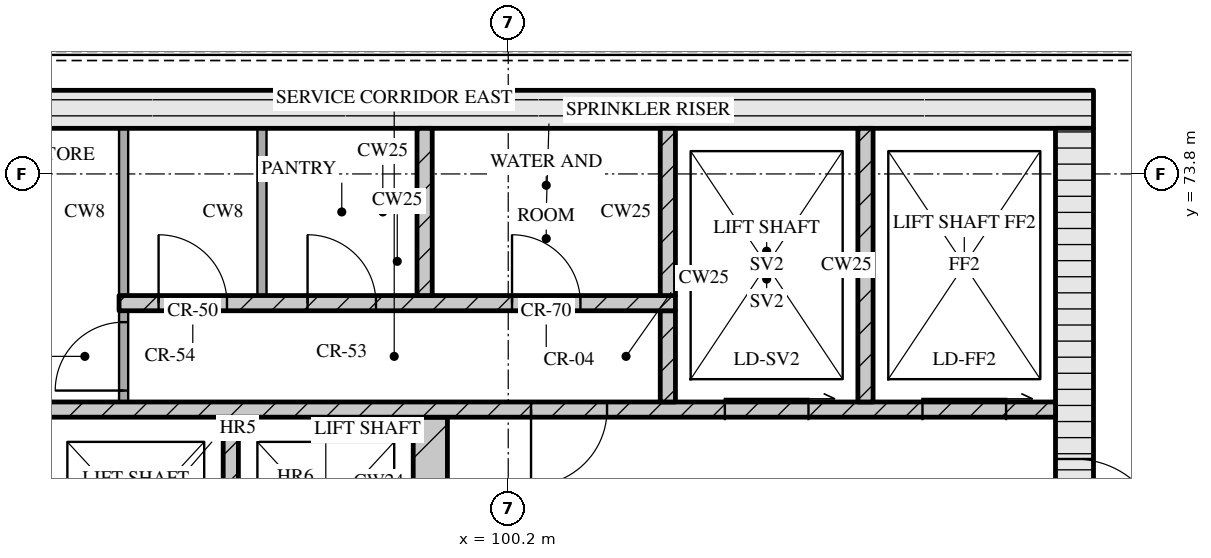
"""IFC4 building model, lengths in metres.
Left out: names, types, materials, properties, quantities, classifications, styles, units other than length and angle.
Written with IfcOpenShell. Run it as: python <this file> out.ifc"""

import sys

from ifc_helpers import new_model, si_unit, direction, frame, frame_2d, origin, place, context, subcontext, project, spatial, rectangle, extrude, element, fill, save


model = new_model("IFC4")
c1 = context("Model", 3, precision=1e-05, world=origin(), true_north=direction((0.0, 1.0)))
c2 = subcontext(c1, "Body", "Model", "MODEL_VIEW")
j1 = project(units=[si_unit("LENGTHUNIT", "METRE"), si_unit("PLANEANGLEUNIT", "RADIAN")], contexts=[c1])
p1 = place(None, origin())
s1 = spatial("IfcSite", under=j1, at=p1, CompositionType="ELEMENT")
p2 = place(p1, origin())
s2 = spatial("IfcBuilding", under=s1, at=p2, CompositionType="ELEMENT")
p3 = place(p2, frame((0.0, 0.0, 274.35)))
s3 = spatial("IfcBuildingStorey", under=s2, at=p3, CompositionType="ELEMENT", Elevation=274.35)
p4 = place(p3, frame((67.3, 74.65, 0.0), z_axis=(0.0, 0.0, 1.0), x_axis=(1.0, 0.0, 0.0)))
e1 = element("IfcWall", 1, at=p4, inside=s3, PredefinedType="SOLIDWALL", context=c2, shape_type="SweptSolid", body=[
    extrude(rectangle(XDim=40.6, YDim=0.5, at=frame_2d((20.3, 0.0))), origin(), (0.0, 0.0, 1.0), 3.32),
])
p5 = place(p3, frame((107.65, 62.4, 0.0), z_axis=(0.0, 0.0, 1.0), x_axis=(0.0, 1.0, 0.0)))
e2 = element("IfcWall", 2, at=p5, inside=s3, PredefinedType="SOLIDWALL", context=c2, shape_type="SweptSolid", body=[
    extrude(rectangle(XDim=12.0, YDim=0.5, at=frame_2d((6.0, 0.0))), origin(), (0.0, 0.0, 1.0), 3.32),
])
p6 = place(p5, frame((6.45, 0.0, 0.0)))
e3 = element("IfcOpeningElement", 3, at=p6, cuts=e2, PredefinedType="OPENING", context=c2, shape_type="SweptSolid", body=[
    extrude(rectangle(XDim=1.2, YDim=2.1, at=frame_2d((0.6, 1.05))), frame((0.0, 0.26, 0.0), z_axis=(0.0, -1.0, 0.0), x_axis=(1.0, 0.0, 0.0)), (0.0, 0.0, 1.0), 0.52),
])
p7 = place(p3, frame((96.55, 68.0, 0.0), z_axis=(0.0, 0.0, 1.0), x_axis=(0.0, 1.0, 0.0)))
e4 = element("IfcWall", 4, at=p7, inside=s3, PredefinedType="SOLIDWALL", context=c2, shape_type="SweptSolid", body=[
    extrude(rectangle(XDim=2.6, YDim=0.2, at=frame_2d((1.3, 0.0))), origin(), (0.0, 0.0, 1.0), 3.32),
])
p8 = place(p3, frame((99.175, 68.3, 0.0), z_axis=(0.0, 0.0, 1.0), x_axis=(0.0, 1.0, 0.0)))
e5 = element("IfcWall", 5, at=p8, inside=s3, PredefinedType="SOLIDWALL", context=c2, shape_type="SweptSolid", body=[
    extrude(rectangle(XDim=2.3, YDim=0.45, at=frame_2d((1.15, 0.0))), origin(), (0.0, 0.0, 1.0), 3.32),
])
p9 = place(p3, frame((67.8, 70.7, 0.0), z_axis=(0.0, 0.0, 1.0), x_axis=(1.0, 0.0, 0.0)))
e6 = element("IfcWall", 6, at=p9, inside=s3, PredefinedType="SOLIDWALL", context=c2, shape_type="SweptSolid", body=[
    extrude(rectangle(XDim=39.6, YDim=0.2, at=frame_2d((19.8, 0.0))), origin(), (0.0, 0.0, 1.0), 3.32),
])
p10 = place(p9, frame((0.65, 0.0, 0.0)))
e7 = element("IfcOpeningElement", 7, at=p10, cuts=e6, PredefinedType="OPENING", context=c2, shape_type="SweptSolid", body=[
    extrude(rectangle(XDim=1.1, YDim=2.1, at=frame_2d((0.55, 1.05))), frame((0.0, 0.11, 0.0), z_axis=(0.0, -1.0, 0.0), x_axis=(1.0, 0.0, 0.0)), (0.0, 0.0, 1.0), 0.22),
])
p11 = place(p9, frame((3.25, 0.0, 0.0)))
e8 = element("IfcOpeningElement", 8, at=p11, cuts=e6, PredefinedType="OPENING", context=c2, shape_type="SweptSolid", body=[
    extrude(rectangle(XDim=1.1, YDim=2.1, at=frame_2d((0.55, 1.05))), frame((0.0, 0.11, 0.0), z_axis=(0.0, -1.0, 0.0), x_axis=(1.0, 0.0, 0.0)), (0.0, 0.0, 1.0), 0.22),
])
p12 = place(p9, frame((5.9, 0.0, 0.0)))
e9 = element("IfcOpeningElement", 9, at=p12, cuts=e6, PredefinedType="OPENING", context=c2, shape_type="SweptSolid", body=[
    extrude(rectangle(XDim=1.0, YDim=2.1, at=frame_2d((0.5, 1.05))), frame((0.0, 0.11, 0.0), z_axis=(0.0, -1.0, 0.0), x_axis=(1.0, 0.0, 0.0)), (0.0, 0.0, 1.0), 0.22),
])
p13 = place(p9, frame((21.7, 0.0, 0.0)))
e10 = element("IfcOpeningElement", 10, at=p13, cuts=e6, PredefinedType="OPENING", context=c2, shape_type="SweptSolid", body=[
    extrude(rectangle(XDim=1.0, YDim=2.1, at=frame_2d((0.5, 1.05))), frame((0.0, 0.11, 0.0), z_axis=(0.0, -1.0, 0.0), x_axis=(1.0, 0.0, 0.0)), (0.0, 0.0, 1.0), 0.22),
])
p14 = place(p9, frame((32.7, 0.0, 0.0)))
e11 = element("IfcOpeningElement", 11, at=p14, cuts=e6, PredefinedType="OPENING", context=c2, shape_type="SweptSolid", body=[
    extrude(rectangle(XDim=1.0, YDim=2.1, at=frame_2d((0.5, 1.05))), frame((0.0, 0.11, 0.0), z_axis=(0.0, -1.0, 0.0), x_axis=(1.0, 0.0, 0.0)), (0.0, 0.0, 1.0), 0.22),
])
p15 = place(p9, frame((35.25, 0.0, 0.0)))
e12 = element("IfcOpeningElement", 12, at=p15, cuts=e6, PredefinedType="OPENING", context=c2, shape_type="SweptSolid", body=[
    extrude(rectangle(XDim=1.1, YDim=2.1, at=frame_2d((0.55, 1.05))), frame((0.0, 0.11, 0.0), z_axis=(0.0, -1.0, 0.0), x_axis=(1.0, 0.0, 0.0)), (0.0, 0.0, 1.0), 0.22),
])
p16 = place(p9, frame((37.85, 0.0, 0.0)))
e13 = element("IfcOpeningElement", 13, at=p16, cuts=e6, PredefinedType="OPENING", context=c2, shape_type="SweptSolid", body=[
    extrude(rectangle(XDim=1.1, YDim=2.1, at=frame_2d((0.55, 1.05))), frame((0.0, 0.11, 0.0), z_axis=(0.0, -1.0, 0.0), x_axis=(1.0, 0.0, 0.0)), (0.0, 0.0, 1.0), 0.22),
])
p17 = place(p3, frame((95.14, 70.8, 0.0), z_axis=(0.0, 0.0, 1.0), x_axis=(0.0, 1.0, 0.0)))
e14 = element("IfcWall", 14, at=p17, inside=s3, PredefinedType="PARTITIONING", context=c2, shape_type="SweptSolid", body=[
    extrude(rectangle(XDim=1.2, YDim=0.12, at=frame_2d((0.6, 0.0))), origin(), (0.0, 0.0, 1.0), 3.32),
])
p18 = place(p17, frame((0.15, 0.0, 0.0)))
e15 = element("IfcOpeningElement", 15, at=p18, cuts=e14, PredefinedType="OPENING", context=c2, shape_type="SweptSolid", body=[
    extrude(rectangle(XDim=0.9, YDim=2.1, at=frame_2d((0.45, 1.05))), frame((0.0, 0.07, 0.0), z_axis=(0.0, -1.0, 0.0), x_axis=(1.0, 0.0, 0.0)), (0.0, 0.0, 1.0), 0.14),
])
p19 = place(p3, frame((102.3, 70.8, 0.0), z_axis=(0.0, 0.0, 1.0), x_axis=(0.0, 1.0, 0.0)))
e16 = element("IfcWall", 16, at=p19, inside=s3, PredefinedType="SOLIDWALL", context=c2, shape_type="SweptSolid", body=[
    extrude(rectangle(XDim=1.2, YDim=0.2, at=frame_2d((0.6, 0.0))), origin(), (0.0, 0.0, 1.0), 3.32),
])
p20 = place(p3, frame((104.9, 70.8, 0.0), z_axis=(0.0, 0.0, 1.0), x_axis=(0.0, 1.0, 0.0)))
e17 = element("IfcWall", 17, at=p20, inside=s3, PredefinedType="SOLIDWALL", context=c2, shape_type="SweptSolid", body=[
    extrude(rectangle(XDim=3.6, YDim=0.2, at=frame_2d((1.8, 0.0))), origin(), (0.0, 0.0, 1.0), 3.32),
])
p21 = place(p3, frame((95.08, 72.1, 0.0), z_axis=(0.0, 0.0, 1.0), x_axis=(1.0, 0.0, 0.0)))
e18 = element("IfcWall", 18, at=p21, inside=s3, PredefinedType="SOLIDWALL", context=c2, shape_type="SweptSolid", body=[
    extrude(rectangle(XDim=7.32, YDim=0.2, at=frame_2d((3.66, 0.0))), origin(), (0.0, 0.0, 1.0), 3.32),
])
p22 = place(p21, frame((0.52, 0.0, 0.0)))
e19 = element("IfcOpeningElement", 19, at=p22, cuts=e18, PredefinedType="OPENING", context=c2, shape_type="SweptSolid", body=[
    extrude(rectangle(XDim=0.9, YDim=2.1, at=frame_2d((0.45, 1.05))), frame((0.0, 0.11, 0.0), z_axis=(0.0, -1.0, 0.0), x_axis=(1.0, 0.0, 0.0)), (0.0, 0.0, 1.0), 0.22),
])
p23 = place(p21, frame((2.48, 0.0, 0.0)))
e20 = element("IfcOpeningElement", 20, at=p23, cuts=e18, PredefinedType="OPENING", context=c2, shape_type="SweptSolid", body=[
    extrude(rectangle(XDim=0.9, YDim=2.1, at=frame_2d((0.45, 1.05))), frame((0.0, 0.11, 0.0), z_axis=(0.0, -1.0, 0.0), x_axis=(1.0, 0.0, 0.0)), (0.0, 0.0, 1.0), 0.22),
])
p24 = place(p21, frame((5.17, 0.0, 0.0)))
e21 = element("IfcOpeningElement", 21, at=p24, cuts=e18, PredefinedType="OPENING", context=c2, shape_type="SweptSolid", body=[
    extrude(rectangle(XDim=0.9, YDim=2.1, at=frame_2d((0.45, 1.05))), frame((0.0, 0.11, 0.0), z_axis=(0.0, -1.0, 0.0), x_axis=(1.0, 0.0, 0.0)), (0.0, 0.0, 1.0), 0.22),
])
for number, where, z_axis, x_axis in (
    (22, (95.14, 72.2, 0.0), (0.0, 0.0, 1.0), (0.0, 1.0, 0.0)),
    (23, (96.96, 72.2, 0.0), (0.0, 0.0, 1.0), (0.0, 1.0, 0.0)),
):
    element("IfcWall", number, at=place(p3, frame(where, z_axis=z_axis, x_axis=x_axis)), inside=s3, PredefinedType="PARTITIONING", context=c2, shape_type="SweptSolid", body=[
        extrude(rectangle(XDim=2.2, YDim=0.12, at=frame_2d((1.1, 0.0))), origin(), (0.0, 0.0, 1.0), 3.32),
    ])
for number, where, z_axis, x_axis in (
    (24, (99.1, 72.2, 0.0), (0.0, 0.0, 1.0), (0.0, 1.0, 0.0)),
    (25, (102.3, 72.2, 0.0), (0.0, 0.0, 1.0), (0.0, 1.0, 0.0)),
):
    element("IfcWall", number, at=place(p3, frame(where, z_axis=z_axis, x_axis=x_axis)), inside=s3, PredefinedType="SOLIDWALL", context=c2, shape_type="SweptSolid", body=[
        extrude(rectangle(XDim=2.2, YDim=0.2, at=frame_2d((1.1, 0.0))), origin(), (0.0, 0.0, 1.0), 3.32),
    ])
p25 = place(p6, origin())
e26 = element("IfcDoor", 26, at=p25, inside=s3, OperationType="SINGLE_SWING_RIGHT", PredefinedType="DOOR", context=c2, shape_type="SweptSolid", body=[
    extrude(rectangle(XDim=1.2, YDim=2.1, at=frame_2d((0.6, 1.05))), frame((0.0, 0.025, 0.0), z_axis=(0.0, -1.0, 0.0), x_axis=(1.0, 0.0, 0.0)), (0.0, 0.0, 1.0), 0.05),
])
fill(e3, e26)
p26 = place(p14, origin())
e27 = element("IfcDoor", 27, at=p26, inside=s3, OperationType="SINGLE_SWING_RIGHT", PredefinedType="DOOR", context=c2, shape_type="SweptSolid", body=[
    extrude(rectangle(XDim=1.0, YDim=2.1, at=frame_2d((0.5, 1.05))), frame((0.0, 0.025, 0.0), z_axis=(0.0, -1.0, 0.0), x_axis=(1.0, 0.0, 0.0)), (0.0, 0.0, 1.0), 0.05),
])
fill(e11, e27)
p27 = place(p15, origin())
e28 = element("IfcDoor", 28, at=p27, inside=s3, OperationType="SLIDING_TO_RIGHT", PredefinedType="DOOR", context=c2, shape_type="SweptSolid", body=[
    extrude(rectangle(XDim=1.1, YDim=2.1, at=frame_2d((0.55, 1.05))), frame((0.0, 0.025, 0.0), z_axis=(0.0, -1.0, 0.0), x_axis=(1.0, 0.0, 0.0)), (0.0, 0.0, 1.0), 0.05),
])
fill(e12, e28)
p28 = place(p16, origin())
e29 = element("IfcDoor", 29, at=p28, inside=s3, OperationType="SLIDING_TO_RIGHT", PredefinedType="DOOR", context=c2, shape_type="SweptSolid", body=[
    extrude(rectangle(XDim=1.1, YDim=2.1, at=frame_2d((0.55, 1.05))), frame((0.0, 0.025, 0.0), z_axis=(0.0, -1.0, 0.0), x_axis=(1.0, 0.0, 0.0)), (0.0, 0.0, 1.0), 0.05),
])
fill(e13, e29)
p29 = place(p18, origin())
e30 = element("IfcDoor", 30, at=p29, inside=s3, OperationType="SINGLE_SWING_LEFT", PredefinedType="DOOR", context=c2, shape_type="SweptSolid", body=[
    extrude(rectangle(XDim=0.9, YDim=2.1, at=frame_2d((0.45, 1.05))), frame((0.0, 0.025, 0.0), z_axis=(0.0, -1.0, 0.0), x_axis=(1.0, 0.0, 0.0)), (0.0, 0.0, 1.0), 0.05),
])
fill(e15, e30)
p30 = place(p22, origin())
e31 = element("IfcDoor", 31, at=p30, inside=s3, OperationType="SINGLE_SWING_LEFT", PredefinedType="DOOR", context=c2, shape_type="SweptSolid", body=[
    extrude(rectangle(XDim=0.9, YDim=2.1, at=frame_2d((0.45, 1.05))), frame((0.0, 0.025, 0.0), z_axis=(0.0, -1.0, 0.0), x_axis=(1.0, 0.0, 0.0)), (0.0, 0.0, 1.0), 0.05),
])
fill(e19, e31)
p31 = place(p23, origin())
e32 = element("IfcDoor", 32, at=p31, inside=s3, OperationType="SINGLE_SWING_LEFT", PredefinedType="DOOR", context=c2, shape_type="SweptSolid", body=[
    extrude(rectangle(XDim=0.9, YDim=2.1, at=frame_2d((0.45, 1.05))), frame((0.0, 0.025, 0.0), z_axis=(0.0, -1.0, 0.0), x_axis=(1.0, 0.0, 0.0)), (0.0, 0.0, 1.0), 0.05),
])
fill(e20, e32)
p32 = place(p24, origin())
e33 = element("IfcDoor", 33, at=p32, inside=s3, OperationType="SINGLE_SWING_LEFT", PredefinedType="DOOR", context=c2, shape_type="SweptSolid", body=[
    extrude(rectangle(XDim=0.9, YDim=2.1, at=frame_2d((0.45, 1.05))), frame((0.0, 0.025, 0.0), z_axis=(0.0, -1.0, 0.0), x_axis=(1.0, 0.0, 0.0)), (0.0, 0.0, 1.0), 0.05),
])
fill(e21, e33)
save(model, sys.argv[1])
